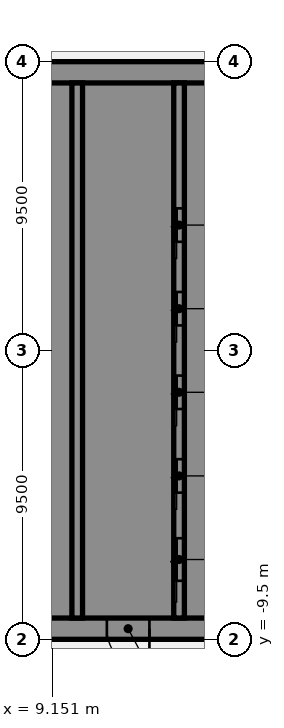
"""IFC4 building model, lengths in metres.
Left out: names, types, materials, properties, quantities, classifications, styles, units other than length and angle.
Written with IfcOpenShell. Run it as: python <this file> out.ifc"""

import sys

from ifc_helpers import new_model, si_unit, direction, frame, frame_2d, origin, place, context, subcontext, project, spatial, polyline, rectangle, outline, extrude, element, fill, save


model = new_model("IFC4")
c1 = context("Model", 3, precision=1e-05, world=origin(), true_north=direction((0.0, 1.0)))
c2 = subcontext(c1, "Body", "Model", "MODEL_VIEW")
j1 = project(units=[si_unit("LENGTHUNIT", "METRE"), si_unit("PLANEANGLEUNIT", "RADIAN")], contexts=[c1])
p1 = place(None, origin())
s1 = spatial("IfcSite", under=j1, at=p1, CompositionType="ELEMENT")
p2 = place(p1, origin())
s2 = spatial("IfcBuilding", under=s1, at=p2, CompositionType="ELEMENT")
p3 = place(p2, frame((0.0, 0.0, 75.25)))
s3 = spatial("IfcBuildingStorey", under=s2, at=p3, CompositionType="ELEMENT", Elevation=75.25)
p4 = place(p3, frame((16.5, -9.15, 0.0), z_axis=(0.0, 0.0, 1.0), x_axis=(-1.0, 0.0, 0.0)))
e1 = element("IfcWall", 1, at=p4, inside=s3, PredefinedType="SHEAR", context=c2, shape_type="SweptSolid", body=[
    extrude(rectangle(XDim=13.0, YDim=0.7, at=frame_2d((6.5, 0.0))), origin(), (0.0, 0.0, 1.0), 3.57),
])
p5 = place(p4, frame((4.15, 0.0, 0.0)))
e2 = element("IfcOpeningElement", 2, at=p5, cuts=e1, PredefinedType="OPENING", context=c2, shape_type="SweptSolid", body=[
    extrude(rectangle(XDim=1.4, YDim=2.1, at=frame_2d((0.7, 1.05))), frame((0.0, 0.36, 0.0), z_axis=(0.0, -1.0, 0.0), x_axis=(1.0, 0.0, 0.0)), (0.0, 0.0, 1.0), 0.72),
])
p6 = place(p4, frame((10.125, 0.0, 0.0)))
e3 = element("IfcOpeningElement", 3, at=p6, cuts=e1, PredefinedType="OPENING", context=c2, shape_type="SweptSolid", body=[
    extrude(rectangle(XDim=1.4, YDim=2.1, at=frame_2d((0.7, 1.05))), frame((0.0, 0.36, 0.0), z_axis=(0.0, -1.0, 0.0), x_axis=(1.0, 0.0, 0.0)), (0.0, 0.0, 1.0), 0.72),
])
p7 = place(p3, origin())
e4 = element("IfcWall", 4, at=p7, inside=s3, PredefinedType="SHEAR", context=c2, shape_type="SweptSolid", body=[
    extrude(outline(polyline([(13.5, -8.8), (15.8, -8.8), (16.5, -8.8), (16.5, 8.8), (15.8, 8.8), (13.5, 8.8), (13.5, 8.125), (15.8, 8.125), (15.8, 5.625), (13.5, 5.625), (13.5, 5.375), (15.8, 5.375), (15.8, 2.875), (13.5, 2.875), (13.5, 2.625), (15.8, 2.625), (15.8, 0.125), (13.5, 0.125), (13.5, -0.125), (15.8, -0.125), (15.8, -2.625), (13.5, -2.625), (13.5, -2.875), (15.8, -2.875), (15.8, -5.375), (13.5, -5.375), (13.5, -5.625), (15.8, -5.625), (15.8, -8.125), (13.5, -8.125), (13.5, -8.8)])), origin(), (0.0, 0.0, 1.0), 3.57),
])
p8 = place(p3, frame((16.5, 9.15, 0.0), z_axis=(0.0, 0.0, 1.0), x_axis=(-1.0, 0.0, 0.0)))
e5 = element("IfcWall", 5, at=p8, inside=s3, PredefinedType="SHEAR", context=c2, shape_type="SweptSolid", body=[
    extrude(rectangle(XDim=13.0, YDim=0.7, at=frame_2d((6.5, 0.0))), origin(), (0.0, 0.0, 1.0), 3.57),
])
p9 = place(p3, origin())
e6 = element("IfcWall", 6, at=p9, inside=s3, PredefinedType="SHEAR", context=c2, shape_type="SweptSolid", body=[
    extrude(outline(polyline([(9.8, -5.375), (7.5, -5.375), (7.5, -2.875), (9.8, -2.875), (9.8, -2.625), (7.5, -2.625), (7.5, -0.125), (9.8, -0.125), (9.8, 0.125), (7.5, 0.125), (7.5, 2.625), (9.8, 2.625), (9.8, 2.875), (7.5, 2.875), (7.5, 5.375), (9.8, 5.375), (9.8, 5.625), (7.5, 5.625), (7.5, 8.125), (9.8, 8.125), (9.8, 8.8), (7.5, 8.8), (7.15, 8.8), (7.15, -5.625), (7.5, -5.625), (9.8, -5.625), (9.8, -5.375)])), origin(), (0.0, 0.0, 1.0), 3.57),
])
p10 = place(p3, origin())
e7 = element("IfcWall", 7, at=p10, inside=s3, PredefinedType="SHEAR", context=c2, shape_type="SweptSolid", body=[
    extrude(outline(polyline([(7.5, -8.125), (7.5, -8.8), (9.8, -8.8), (9.8, -8.125), (9.8, -5.625), (9.55, -5.625), (9.55, -8.125), (7.5, -8.125)])), origin(), (0.0, 0.0, 1.0), 3.57),
])
p11 = place(p3, frame((13.325, -8.8, 0.0), z_axis=(0.0, 0.0, 1.0), x_axis=(0.0, 1.0, 0.0)))
e8 = element("IfcWall", 8, at=p11, inside=s3, PredefinedType="SHEAR", context=c2, shape_type="SweptSolid", body=[
    extrude(rectangle(XDim=17.6, YDim=0.35, at=frame_2d((8.8, 0.0))), origin(), (0.0, 0.0, 1.0), 3.57),
])
p12 = place(p11, frame((1.225, 0.0, 0.0)))
e9 = element("IfcOpeningElement", 9, at=p12, cuts=e8, PredefinedType="OPENING", context=c2, shape_type="SweptSolid", body=[
    extrude(rectangle(XDim=1.4, YDim=2.1, at=frame_2d((0.7, 1.05))), frame((0.0, 0.185, 0.0), z_axis=(0.0, -1.0, 0.0), x_axis=(1.0, 0.0, 0.0)), (0.0, 0.0, 1.0), 0.37),
])
p13 = place(p11, frame((4.125, 0.0, 0.0)))
e10 = element("IfcOpeningElement", 10, at=p13, cuts=e8, PredefinedType="OPENING", context=c2, shape_type="SweptSolid", body=[
    extrude(rectangle(XDim=1.1, YDim=2.1, at=frame_2d((0.55, 1.05))), frame((0.0, 0.185, 0.0), z_axis=(0.0, -1.0, 0.0), x_axis=(1.0, 0.0, 0.0)), (0.0, 0.0, 1.0), 0.37),
])
p14 = place(p11, frame((6.875, 0.0, 0.0)))
e11 = element("IfcOpeningElement", 11, at=p14, cuts=e8, PredefinedType="OPENING", context=c2, shape_type="SweptSolid", body=[
    extrude(rectangle(XDim=1.1, YDim=2.1, at=frame_2d((0.55, 1.05))), frame((0.0, 0.185, 0.0), z_axis=(0.0, -1.0, 0.0), x_axis=(1.0, 0.0, 0.0)), (0.0, 0.0, 1.0), 0.37),
])
p15 = place(p11, frame((9.625, 0.0, 0.0)))
e12 = element("IfcOpeningElement", 12, at=p15, cuts=e8, PredefinedType="OPENING", context=c2, shape_type="SweptSolid", body=[
    extrude(rectangle(XDim=1.1, YDim=2.1, at=frame_2d((0.55, 1.05))), frame((0.0, 0.185, 0.0), z_axis=(0.0, -1.0, 0.0), x_axis=(1.0, 0.0, 0.0)), (0.0, 0.0, 1.0), 0.37),
])
p16 = place(p11, frame((12.375, 0.0, 0.0)))
e13 = element("IfcOpeningElement", 13, at=p16, cuts=e8, PredefinedType="OPENING", context=c2, shape_type="SweptSolid", body=[
    extrude(rectangle(XDim=1.1, YDim=2.1, at=frame_2d((0.55, 1.05))), frame((0.0, 0.185, 0.0), z_axis=(0.0, -1.0, 0.0), x_axis=(1.0, 0.0, 0.0)), (0.0, 0.0, 1.0), 0.37),
])
p17 = place(p3, frame((9.975, -8.8, 0.0), z_axis=(0.0, 0.0, 1.0), x_axis=(0.0, 1.0, 0.0)))
e14 = element("IfcWall", 14, at=p17, inside=s3, PredefinedType="SHEAR", context=c2, shape_type="SweptSolid", body=[
    extrude(rectangle(XDim=17.6, YDim=0.35, at=frame_2d((8.8, 0.0))), origin(), (0.0, 0.0, 1.0), 3.57),
])
p18 = place(p5, origin())
e15 = element("IfcDoor", 15, at=p18, inside=s3, OperationType="SINGLE_SWING_LEFT", PredefinedType="DOOR", context=c2, shape_type="SweptSolid", body=[
    extrude(rectangle(XDim=1.4, YDim=2.1, at=frame_2d((0.7, 1.05))), frame((0.0, 0.025, 0.0), z_axis=(0.0, -1.0, 0.0), x_axis=(1.0, 0.0, 0.0)), (0.0, 0.0, 1.0), 0.05),
])
fill(e2, e15)
p19 = place(p12, origin())
e16 = element("IfcDoor", 16, at=p19, inside=s3, OperationType="SLIDING_TO_LEFT", PredefinedType="DOOR", context=c2, shape_type="SweptSolid", body=[
    extrude(rectangle(XDim=1.4, YDim=2.1, at=frame_2d((0.7, 1.05))), frame((0.0, 0.025, 0.0), z_axis=(0.0, -1.0, 0.0), x_axis=(1.0, 0.0, 0.0)), (0.0, 0.0, 1.0), 0.05),
])
fill(e9, e16)
p20 = place(p13, origin())
e17 = element("IfcDoor", 17, at=p20, inside=s3, OperationType="SLIDING_TO_LEFT", PredefinedType="DOOR", context=c2, shape_type="SweptSolid", body=[
    extrude(rectangle(XDim=1.1, YDim=2.1, at=frame_2d((0.55, 1.05))), frame((0.0, 0.025, 0.0), z_axis=(0.0, -1.0, 0.0), x_axis=(1.0, 0.0, 0.0)), (0.0, 0.0, 1.0), 0.05),
])
fill(e10, e17)
p21 = place(p14, origin())
e18 = element("IfcDoor", 18, at=p21, inside=s3, OperationType="SLIDING_TO_LEFT", PredefinedType="DOOR", context=c2, shape_type="SweptSolid", body=[
    extrude(rectangle(XDim=1.1, YDim=2.1, at=frame_2d((0.55, 1.05))), frame((0.0, 0.025, 0.0), z_axis=(0.0, -1.0, 0.0), x_axis=(1.0, 0.0, 0.0)), (0.0, 0.0, 1.0), 0.05),
])
fill(e11, e18)
p22 = place(p15, origin())
e19 = element("IfcDoor", 19, at=p22, inside=s3, OperationType="SLIDING_TO_LEFT", PredefinedType="DOOR", context=c2, shape_type="SweptSolid", body=[
    extrude(rectangle(XDim=1.1, YDim=2.1, at=frame_2d((0.55, 1.05))), frame((0.0, 0.025, 0.0), z_axis=(0.0, -1.0, 0.0), x_axis=(1.0, 0.0, 0.0)), (0.0, 0.0, 1.0), 0.05),
])
fill(e12, e19)
p23 = place(p16, origin())
e20 = element("IfcDoor", 20, at=p23, inside=s3, OperationType="SLIDING_TO_LEFT", PredefinedType="DOOR", context=c2, shape_type="SweptSolid", body=[
    extrude(rectangle(XDim=1.1, YDim=2.1, at=frame_2d((0.55, 1.05))), frame((0.0, 0.025, 0.0), z_axis=(0.0, -1.0, 0.0), x_axis=(1.0, 0.0, 0.0)), (0.0, 0.0, 1.0), 0.05),
])
fill(e13, e20)
save(model, sys.argv[1])
